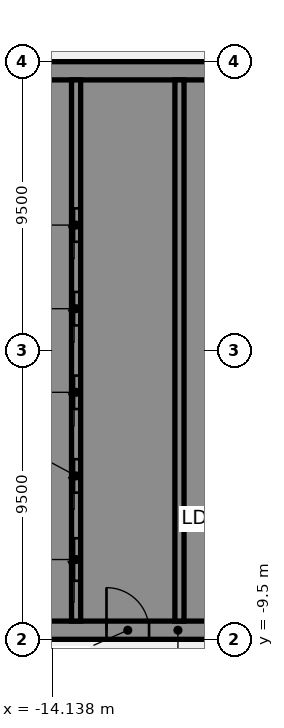
"""IFC4 building model, lengths in metres.
Left out: names, types, materials, properties, quantities, classifications, styles, units other than length and angle.
Written with IfcOpenShell. Run it as: python <this file> out.ifc"""

import sys

from ifc_helpers import new_model, si_unit, direction, frame, frame_2d, origin, place, context, subcontext, project, spatial, polyline, rectangle, outline, extrude, element, fill, save


model = new_model("IFC4")
c1 = context("Model", 3, precision=1e-05, world=origin(), true_north=direction((0.0, 1.0)))
c2 = subcontext(c1, "Body", "Model", "MODEL_VIEW")
j1 = project(units=[si_unit("LENGTHUNIT", "METRE"), si_unit("PLANEANGLEUNIT", "RADIAN")], contexts=[c1])
p1 = place(None, origin())
s1 = spatial("IfcSite", under=j1, at=p1, CompositionType="ELEMENT")
p2 = place(p1, origin())
s2 = spatial("IfcBuilding", under=s1, at=p2, CompositionType="ELEMENT")
p3 = place(p2, frame((0.0, 0.0, 102.25)))
s3 = spatial("IfcBuildingStorey", under=s2, at=p3, CompositionType="ELEMENT", Elevation=102.25)
p4 = place(p3, frame((-16.5, -9.2, 0.0), z_axis=(0.0, 0.0, 1.0), x_axis=(1.0, 0.0, 0.0)))
e1 = element("IfcWall", 1, at=p4, inside=s3, PredefinedType="SHEAR", context=c2, shape_type="SweptSolid", body=[
    extrude(rectangle(XDim=13.0, YDim=0.6, at=frame_2d((6.5, 0.0))), origin(), (0.0, 0.0, 1.0), 3.61),
])
p5 = place(p4, frame((4.15, 0.0, 0.0)))
e2 = element("IfcOpeningElement", 2, at=p5, cuts=e1, PredefinedType="OPENING", context=c2, shape_type="SweptSolid", body=[
    extrude(rectangle(XDim=1.4, YDim=2.1, at=frame_2d((0.7, 1.05))), frame((0.0, 0.31, 0.0), z_axis=(0.0, -1.0, 0.0), x_axis=(1.0, 0.0, 0.0)), (0.0, 0.0, 1.0), 0.62),
])
p6 = place(p4, frame((10.125, 0.0, 0.0)))
e3 = element("IfcOpeningElement", 3, at=p6, cuts=e1, PredefinedType="OPENING", context=c2, shape_type="SweptSolid", body=[
    extrude(rectangle(XDim=1.4, YDim=2.1, at=frame_2d((0.7, 1.05))), frame((0.0, 0.31, 0.0), z_axis=(0.0, -1.0, 0.0), x_axis=(1.0, 0.0, 0.0)), (0.0, 0.0, 1.0), 0.62),
])
p7 = place(p3, origin())
e4 = element("IfcWall", 4, at=p7, inside=s3, PredefinedType="SHEAR", context=c2, shape_type="SweptSolid", body=[
    extrude(outline(polyline([(-13.5, -8.9), (-13.5, -8.125), (-15.9, -8.125), (-15.9, -5.625), (-13.5, -5.625), (-13.5, -5.375), (-15.9, -5.375), (-15.9, -2.875), (-13.5, -2.875), (-13.5, -2.625), (-15.9, -2.625), (-15.9, -0.125), (-13.5, -0.125), (-13.5, 0.125), (-15.9, 0.125), (-15.9, 2.625), (-13.5, 2.625), (-13.5, 2.875), (-15.9, 2.875), (-15.9, 5.375), (-13.5, 5.375), (-13.5, 5.625), (-15.9, 5.625), (-15.9, 8.125), (-13.5, 8.125), (-13.5, 8.9), (-15.9, 8.9), (-16.5, 8.9), (-16.5, -8.9), (-15.9, -8.9), (-13.5, -8.9)])), origin(), (0.0, 0.0, 1.0), 3.61),
])
p8 = place(p3, frame((-16.5, 9.2, 0.0), z_axis=(0.0, 0.0, 1.0), x_axis=(1.0, 0.0, 0.0)))
e5 = element("IfcWall", 5, at=p8, inside=s3, PredefinedType="SHEAR", context=c2, shape_type="SweptSolid", body=[
    extrude(rectangle(XDim=13.0, YDim=0.6, at=frame_2d((6.5, 0.0))), origin(), (0.0, 0.0, 1.0), 3.61),
])
p9 = place(p3, origin())
e6 = element("IfcWall", 6, at=p9, inside=s3, PredefinedType="SHEAR", context=c2, shape_type="SweptSolid", body=[
    extrude(outline(polyline([(-9.8, -5.375), (-9.8, -5.625), (-7.5, -5.625), (-7.2, -5.625), (-7.2, 8.9), (-7.5, 8.9), (-9.8, 8.9), (-9.8, 8.125), (-7.5, 8.125), (-7.5, 5.625), (-9.8, 5.625), (-9.8, 5.375), (-7.5, 5.375), (-7.5, 2.875), (-9.8, 2.875), (-9.8, 2.625), (-7.5, 2.625), (-7.5, 0.125), (-9.8, 0.125), (-9.8, -0.125), (-7.5, -0.125), (-7.5, -2.625), (-9.8, -2.625), (-9.8, -2.875), (-7.5, -2.875), (-7.5, -5.375), (-9.8, -5.375)])), origin(), (0.0, 0.0, 1.0), 3.61),
])
p10 = place(p3, origin())
e7 = element("IfcWall", 7, at=p10, inside=s3, PredefinedType="SHEAR", context=c2, shape_type="SweptSolid", body=[
    extrude(outline(polyline([(-7.5, -8.125), (-9.55, -8.125), (-9.55, -5.625), (-9.8, -5.625), (-9.8, -8.125), (-9.8, -8.9), (-7.5, -8.9), (-7.5, -8.125)])), origin(), (0.0, 0.0, 1.0), 3.61),
])
p11 = place(p3, frame((-13.35, -8.9, 0.0), z_axis=(0.0, 0.0, 1.0), x_axis=(0.0, 1.0, 0.0)))
e8 = element("IfcWall", 8, at=p11, inside=s3, PredefinedType="SHEAR", context=c2, shape_type="SweptSolid", body=[
    extrude(rectangle(XDim=17.8, YDim=0.3, at=frame_2d((8.9, 0.0))), origin(), (0.0, 0.0, 1.0), 3.61),
])
p12 = place(p11, frame((1.325, 0.0, 0.0)))
e9 = element("IfcOpeningElement", 9, at=p12, cuts=e8, PredefinedType="OPENING", context=c2, shape_type="SweptSolid", body=[
    extrude(rectangle(XDim=1.4, YDim=2.1, at=frame_2d((0.7, 1.05))), frame((0.0, 0.16, 0.0), z_axis=(0.0, -1.0, 0.0), x_axis=(1.0, 0.0, 0.0)), (0.0, 0.0, 1.0), 0.32),
])
p13 = place(p11, frame((4.225, 0.0, 0.0)))
e10 = element("IfcOpeningElement", 10, at=p13, cuts=e8, PredefinedType="OPENING", context=c2, shape_type="SweptSolid", body=[
    extrude(rectangle(XDim=1.1, YDim=2.1, at=frame_2d((0.55, 1.05))), frame((0.0, 0.16, 0.0), z_axis=(0.0, -1.0, 0.0), x_axis=(1.0, 0.0, 0.0)), (0.0, 0.0, 1.0), 0.32),
])
p14 = place(p11, frame((6.975, 0.0, 0.0)))
e11 = element("IfcOpeningElement", 11, at=p14, cuts=e8, PredefinedType="OPENING", context=c2, shape_type="SweptSolid", body=[
    extrude(rectangle(XDim=1.1, YDim=2.1, at=frame_2d((0.55, 1.05))), frame((0.0, 0.16, 0.0), z_axis=(0.0, -1.0, 0.0), x_axis=(1.0, 0.0, 0.0)), (0.0, 0.0, 1.0), 0.32),
])
p15 = place(p11, frame((9.725, 0.0, 0.0)))
e12 = element("IfcOpeningElement", 12, at=p15, cuts=e8, PredefinedType="OPENING", context=c2, shape_type="SweptSolid", body=[
    extrude(rectangle(XDim=1.1, YDim=2.1, at=frame_2d((0.55, 1.05))), frame((0.0, 0.16, 0.0), z_axis=(0.0, -1.0, 0.0), x_axis=(1.0, 0.0, 0.0)), (0.0, 0.0, 1.0), 0.32),
])
p16 = place(p11, frame((12.475, 0.0, 0.0)))
e13 = element("IfcOpeningElement", 13, at=p16, cuts=e8, PredefinedType="OPENING", context=c2, shape_type="SweptSolid", body=[
    extrude(rectangle(XDim=1.1, YDim=2.1, at=frame_2d((0.55, 1.05))), frame((0.0, 0.16, 0.0), z_axis=(0.0, -1.0, 0.0), x_axis=(1.0, 0.0, 0.0)), (0.0, 0.0, 1.0), 0.32),
])
p17 = place(p3, frame((-9.95, -8.9, 0.0), z_axis=(0.0, 0.0, 1.0), x_axis=(0.0, 1.0, 0.0)))
e14 = element("IfcWall", 14, at=p17, inside=s3, PredefinedType="SHEAR", context=c2, shape_type="SweptSolid", body=[
    extrude(rectangle(XDim=17.8, YDim=0.3, at=frame_2d((8.9, 0.0))), origin(), (0.0, 0.0, 1.0), 3.61),
])
p18 = place(p5, origin())
e15 = element("IfcDoor", 15, at=p18, inside=s3, OperationType="SINGLE_SWING_LEFT", PredefinedType="DOOR", context=c2, shape_type="SweptSolid", body=[
    extrude(rectangle(XDim=1.4, YDim=2.1, at=frame_2d((0.7, 1.05))), frame((0.0, 0.025, 0.0), z_axis=(0.0, -1.0, 0.0), x_axis=(1.0, 0.0, 0.0)), (0.0, 0.0, 1.0), 0.05),
])
fill(e2, e15)
p19 = place(p12, origin())
e16 = element("IfcDoor", 16, at=p19, inside=s3, OperationType="SLIDING_TO_LEFT", PredefinedType="DOOR", context=c2, shape_type="SweptSolid", body=[
    extrude(rectangle(XDim=1.4, YDim=2.1, at=frame_2d((0.7, 1.05))), frame((0.0, 0.025, 0.0), z_axis=(0.0, -1.0, 0.0), x_axis=(1.0, 0.0, 0.0)), (0.0, 0.0, 1.0), 0.05),
])
fill(e9, e16)
p20 = place(p13, origin())
e17 = element("IfcDoor", 17, at=p20, inside=s3, OperationType="SLIDING_TO_LEFT", PredefinedType="DOOR", context=c2, shape_type="SweptSolid", body=[
    extrude(rectangle(XDim=1.1, YDim=2.1, at=frame_2d((0.55, 1.05))), frame((0.0, 0.025, 0.0), z_axis=(0.0, -1.0, 0.0), x_axis=(1.0, 0.0, 0.0)), (0.0, 0.0, 1.0), 0.05),
])
fill(e10, e17)
p21 = place(p14, origin())
e18 = element("IfcDoor", 18, at=p21, inside=s3, OperationType="SLIDING_TO_LEFT", PredefinedType="DOOR", context=c2, shape_type="SweptSolid", body=[
    extrude(rectangle(XDim=1.1, YDim=2.1, at=frame_2d((0.55, 1.05))), frame((0.0, 0.025, 0.0), z_axis=(0.0, -1.0, 0.0), x_axis=(1.0, 0.0, 0.0)), (0.0, 0.0, 1.0), 0.05),
])
fill(e11, e18)
p22 = place(p15, origin())
e19 = element("IfcDoor", 19, at=p22, inside=s3, OperationType="SLIDING_TO_LEFT", PredefinedType="DOOR", context=c2, shape_type="SweptSolid", body=[
    extrude(rectangle(XDim=1.1, YDim=2.1, at=frame_2d((0.55, 1.05))), frame((0.0, 0.025, 0.0), z_axis=(0.0, -1.0, 0.0), x_axis=(1.0, 0.0, 0.0)), (0.0, 0.0, 1.0), 0.05),
])
fill(e12, e19)
p23 = place(p16, origin())
e20 = element("IfcDoor", 20, at=p23, inside=s3, OperationType="SLIDING_TO_LEFT", PredefinedType="DOOR", context=c2, shape_type="SweptSolid", body=[
    extrude(rectangle(XDim=1.1, YDim=2.1, at=frame_2d((0.55, 1.05))), frame((0.0, 0.025, 0.0), z_axis=(0.0, -1.0, 0.0), x_axis=(1.0, 0.0, 0.0)), (0.0, 0.0, 1.0), 0.05),
])
fill(e13, e20)
save(model, sys.argv[1])
